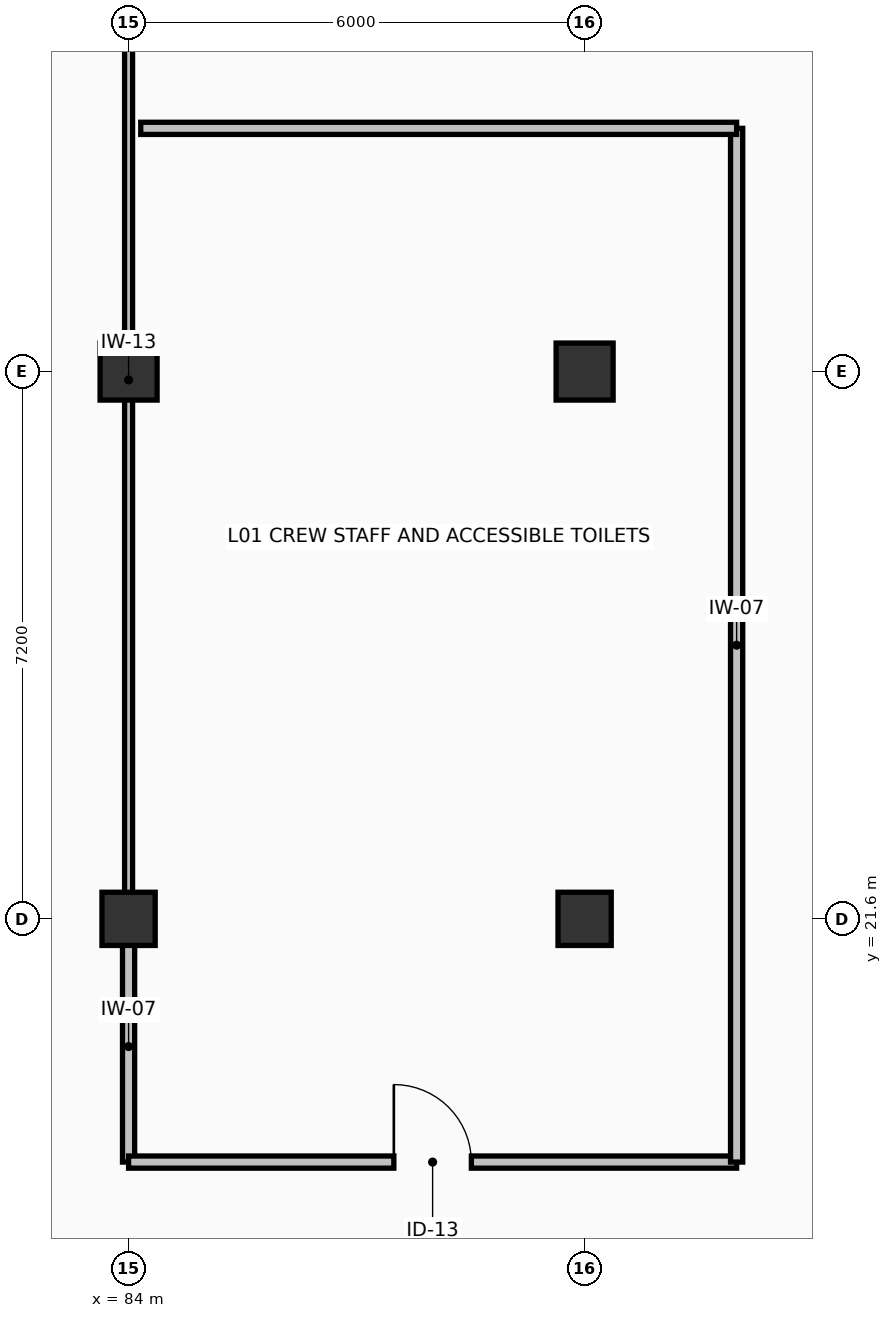
"""IFC4 building model, lengths in metres.
Left out: names, types, materials, properties, quantities, classifications, styles, units other than length and angle.
Written with IfcOpenShell. Run it as: python <this file> out.ifc"""

import sys

from ifc_helpers import new_model, si_unit, direction, frame, frame_2d, origin, origin_2d, place, context, subcontext, project, spatial, rectangle, extrude, element, fill, save


model = new_model("IFC4")
c1 = context("Model", 3, precision=1e-05, world=origin(), true_north=direction((0.0, 1.0)))
c2 = subcontext(c1, "Body", "Model", "MODEL_VIEW")
j1 = project(units=[si_unit("LENGTHUNIT", "METRE"), si_unit("PLANEANGLEUNIT", "RADIAN")], contexts=[c1])
p1 = place(None, origin())
s1 = spatial("IfcSite", under=j1, at=p1, CompositionType="ELEMENT")
p2 = place(p1, origin())
s2 = spatial("IfcBuilding", under=s1, at=p2, CompositionType="ELEMENT")
p3 = place(p2, frame((0.0, 0.0, 5.76)))
s3 = spatial("IfcBuildingStorey", under=s2, at=p3, CompositionType="ELEMENT", Elevation=5.76)
p4 = place(p3, frame((84.0, 21.6, 0.0), z_axis=(0.0, 0.0, 1.0), x_axis=(1.0, 0.0, 0.0)))
e1 = element("IfcColumn", 1, at=p4, inside=s3, PredefinedType="COLUMN", context=c2, shape_type="SweptSolid", body=[
    extrude(rectangle(XDim=0.7, YDim=0.7, at=origin_2d()), origin(), (0.0, 0.0, 1.0), 4.08),
])
p5 = place(p3, frame((84.0, 28.8, 0.0), z_axis=(0.0, 0.0, 1.0), x_axis=(1.0, 0.0, 0.0)))
e2 = element("IfcColumn", 2, at=p5, inside=s3, PredefinedType="COLUMN", context=c2, shape_type="SweptSolid", body=[
    extrude(rectangle(XDim=0.75, YDim=0.75, at=origin_2d()), origin(), (0.0, 0.0, 1.0), 4.08),
])
p6 = place(p3, frame((90.0, 21.6, 0.0), z_axis=(0.0, 0.0, 1.0), x_axis=(1.0, 0.0, 0.0)))
e3 = element("IfcColumn", 3, at=p6, inside=s3, PredefinedType="COLUMN", context=c2, shape_type="SweptSolid", body=[
    extrude(rectangle(XDim=0.7, YDim=0.7, at=origin_2d()), origin(), (0.0, 0.0, 1.0), 4.08),
])
p7 = place(p3, frame((90.0, 28.8, 0.0), z_axis=(0.0, 0.0, 1.0), x_axis=(1.0, 0.0, 0.0)))
e4 = element("IfcColumn", 4, at=p7, inside=s3, PredefinedType="COLUMN", context=c2, shape_type="SweptSolid", body=[
    extrude(rectangle(XDim=0.75, YDim=0.75, at=origin_2d()), origin(), (0.0, 0.0, 1.0), 4.08),
])
p8 = place(p3, frame((95.196, 27.0, 0.0), z_axis=(0.0, 0.0, 1.0), x_axis=(-0.31624885857, 0.948676266939, 0.0)))
e5 = element("IfcWall", 5, at=p8, inside=s3, PredefinedType="SOLIDWALL", context=c2, shape_type="SweptSolid", body=[
    extrude(rectangle(XDim=6.945, YDim=0.32, at=frame_2d((3.472, 0.0))), origin(), (0.0, 0.0, 1.0), 3.78),
])
p9 = place(p8, frame((3.022, 0.0, 1.15)))
e6 = element("IfcOpeningElement", 6, at=p9, cuts=e5, PredefinedType="OPENING", context=c2, shape_type="SweptSolid", body=[
    extrude(rectangle(XDim=1.0, YDim=1.0, at=frame_2d((0.5, 0.5))), frame((0.0, 0.17, 0.0), z_axis=(0.0, -1.0, 0.0), x_axis=(1.0, 0.0, 0.0)), (0.0, 0.0, 1.0), 0.34),
])
p10 = place(p3, frame((84.0, 21.6, 0.0), z_axis=(0.0, 0.0, 1.0), x_axis=(0.0, 1.0, 0.0)))
e7 = element("IfcWall", 7, at=p10, inside=s3, PredefinedType="PARTITIONING", context=c2, shape_type="SweptSolid", body=[
    extrude(rectangle(XDim=14.18, YDim=0.105, at=frame_2d((7.09, 0.0))), origin(), (0.0, 0.0, 1.0), 2.86),
])
p11 = place(p3, frame((84.0, 21.44, 0.0), z_axis=(0.0, 0.0, 1.0), x_axis=(0.0, -1.0, 0.0)))
e8 = element("IfcWall", 8, at=p11, inside=s3, PredefinedType="PARTITIONING", context=c2, shape_type="SweptSolid", body=[
    extrude(rectangle(XDim=3.04, YDim=0.16, at=frame_2d((1.52, 0.0))), origin(), (0.0, 0.0, 1.0), 3.06),
])
p12 = place(p3, frame((84.0, 18.4, 0.0), z_axis=(0.0, 0.0, 1.0), x_axis=(1.0, 0.0, 0.0)))
e9 = element("IfcWall", 9, at=p12, inside=s3, PredefinedType="PARTITIONING", context=c2, shape_type="SweptSolid", body=[
    extrude(rectangle(XDim=8.0, YDim=0.16, at=frame_2d((4.0, 0.0))), origin(), (0.0, 0.0, 1.0), 3.44),
])
p13 = place(p12, frame((3.49, 0.0, 0.0)))
e10 = element("IfcOpeningElement", 10, at=p13, cuts=e9, PredefinedType="OPENING", context=c2, shape_type="SweptSolid", body=[
    extrude(rectangle(XDim=1.02, YDim=2.1, at=frame_2d((0.51, 1.05))), frame((0.0, 0.09, 0.0), z_axis=(0.0, -1.0, 0.0), x_axis=(1.0, 0.0, 0.0)), (0.0, 0.0, 1.0), 0.18),
])
p14 = place(p3, frame((92.0, 18.4, 0.0), z_axis=(0.0, 0.0, 1.0), x_axis=(0.0, 1.0, 0.0)))
e11 = element("IfcWall", 11, at=p14, inside=s3, PredefinedType="PARTITIONING", context=c2, shape_type="SweptSolid", body=[
    extrude(rectangle(XDim=13.6, YDim=0.16, at=frame_2d((6.8, 0.0))), origin(), (0.0, 0.0, 1.0), 3.44),
])
p15 = place(p3, frame((92.0, 32.0, 0.0), z_axis=(0.0, 0.0, 1.0), x_axis=(-1.0, 0.0, 0.0)))
e12 = element("IfcWall", 12, at=p15, inside=s3, PredefinedType="PARTITIONING", context=c2, shape_type="SweptSolid", body=[
    extrude(rectangle(XDim=7.84, YDim=0.16, at=frame_2d((3.92, 0.0))), origin(), (0.0, 0.0, 1.0), 3.44),
])
p16 = place(p13, origin())
e13 = element("IfcDoor", 13, at=p16, inside=s3, OperationType="SINGLE_SWING_LEFT", PredefinedType="DOOR", context=c2, shape_type="SweptSolid", body=[
    extrude(rectangle(XDim=1.02, YDim=2.1, at=frame_2d((0.51, 1.05))), frame((0.0, 0.025, 0.0), z_axis=(0.0, -1.0, 0.0), x_axis=(1.0, 0.0, 0.0)), (0.0, 0.0, 1.0), 0.05),
])
fill(e10, e13)
save(model, sys.argv[1])
